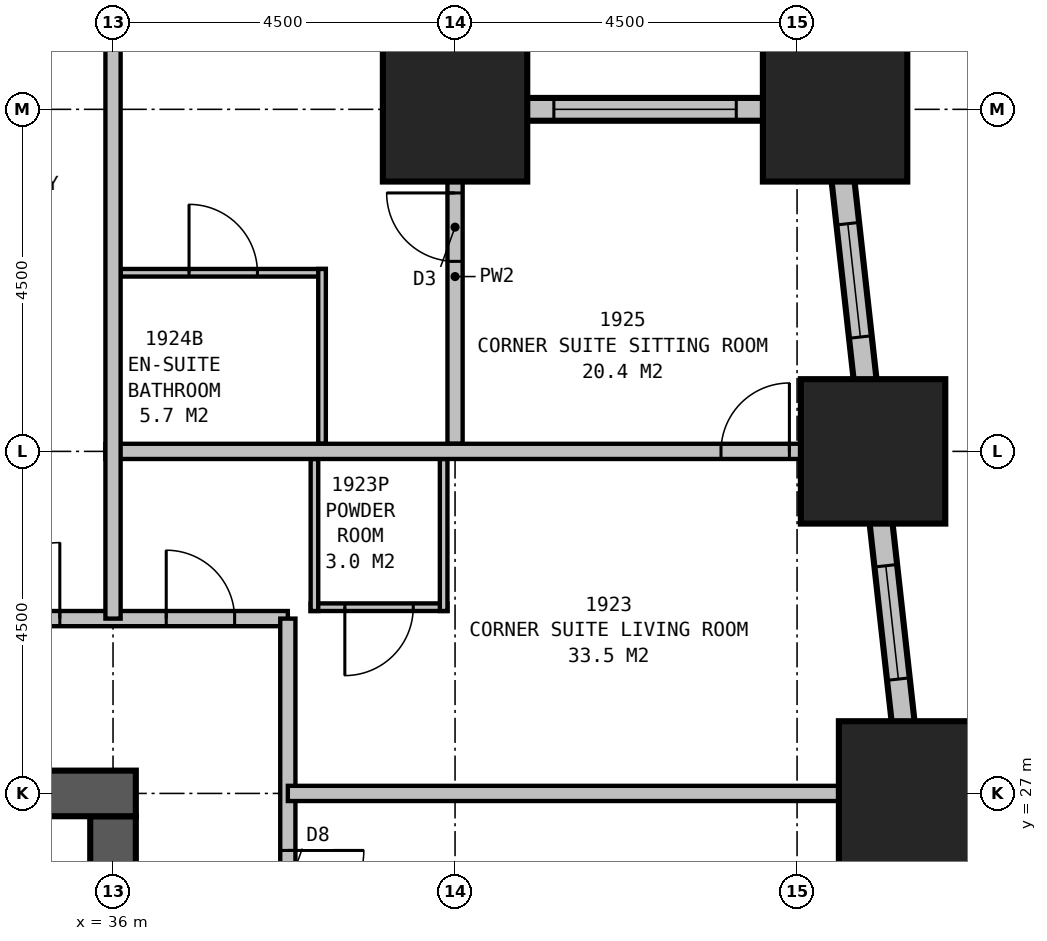
"""IFC4 building model, lengths in metres.
Left out: names, types, materials, properties, quantities, classifications, styles, units other than length and angle.
Written with IfcOpenShell. Run it as: python <this file> out.ifc"""

import sys

from ifc_helpers import new_model, si_unit, direction, frame, frame_2d, origin, origin_2d, place, context, subcontext, project, spatial, rectangle, extrude, element, fill, save


model = new_model("IFC4")
c1 = context("Model", 3, precision=1e-05, world=origin(), true_north=direction((0.0, 1.0)))
c2 = subcontext(c1, "Body", "Model", "MODEL_VIEW")
j1 = project(units=[si_unit("LENGTHUNIT", "METRE"), si_unit("PLANEANGLEUNIT", "RADIAN")], contexts=[c1])
p1 = place(None, origin())
s1 = spatial("IfcSite", under=j1, at=p1, CompositionType="ELEMENT")
p2 = place(p1, origin())
s2 = spatial("IfcBuilding", under=s1, at=p2, CompositionType="ELEMENT")
p3 = place(p2, frame((0.0, 0.0, 78.7)))
s3 = spatial("IfcBuildingStorey", under=s2, at=p3, CompositionType="ELEMENT", Elevation=78.7)
for number, where, z_axis, x_axis in (
    (1, (46.5, 27.0, 0.0), (0.0, 0.0, 1.0), (1.0, 0.0, 0.0)),
    (2, (46.0, 31.5, 0.0), (0.0, 0.0, 1.0), (1.0, 0.0, 0.0)),
    (3, (45.5, 36.0, 0.0), (0.0, 0.0, 1.0), (1.0, 0.0, 0.0)),
    (4, (40.5, 36.0, 0.0), (0.0, 0.0, 1.0), (1.0, 0.0, 0.0)),
):
    element("IfcColumn", number, at=place(p3, frame(where, z_axis=z_axis, x_axis=x_axis)), inside=s3, PredefinedType="COLUMN", context=c2, shape_type="SweptSolid", body=[
        extrude(rectangle(XDim=1.9, YDim=1.9, at=origin_2d()), origin(), (0.0, 0.0, 1.0), 3.5),
    ])
p4 = place(p3, frame((36.3, 27.0, 0.0), z_axis=(0.0, 0.0, 1.0), x_axis=(-1.0, 0.0, 0.0)))
e5 = element("IfcWall", 5, at=p4, inside=s3, PredefinedType="SHEAR", context=c2, shape_type="SweptSolid", body=[
    extrude(rectangle(XDim=23.1, YDim=0.6, at=frame_2d((11.55, 0.0))), origin(), (0.0, 0.0, 1.0), 3.5),
])
p5 = place(p4, frame((17.05, 0.0, 0.0)))
e6 = element("IfcOpeningElement", 6, at=p5, cuts=e5, PredefinedType="OPENING", context=c2, shape_type="SweptSolid", body=[
    extrude(rectangle(XDim=1.0, YDim=2.1, at=frame_2d((0.5, 1.05))), frame((0.0, 0.31, 0.0), z_axis=(0.0, -1.0, 0.0), x_axis=(1.0, 0.0, 0.0)), (0.0, 0.0, 1.0), 0.62),
])
p6 = place(p4, frame((12.05, 0.0, 0.0)))
e7 = element("IfcOpeningElement", 7, at=p6, cuts=e5, PredefinedType="OPENING", context=c2, shape_type="SweptSolid", body=[
    extrude(rectangle(XDim=1.0, YDim=2.1, at=frame_2d((0.5, 1.05))), frame((0.0, 0.31, 0.0), z_axis=(0.0, -1.0, 0.0), x_axis=(1.0, 0.0, 0.0)), (0.0, 0.0, 1.0), 0.62),
])
p7 = place(p4, frame((7.05, 0.0, 0.0)))
e8 = element("IfcOpeningElement", 8, at=p7, cuts=e5, PredefinedType="OPENING", context=c2, shape_type="SweptSolid", body=[
    extrude(rectangle(XDim=1.0, YDim=2.1, at=frame_2d((0.5, 1.05))), frame((0.0, 0.31, 0.0), z_axis=(0.0, -1.0, 0.0), x_axis=(1.0, 0.0, 0.0)), (0.0, 0.0, 1.0), 0.62),
])
p8 = place(p3, frame((36.0, 20.0, 0.0), z_axis=(0.0, 0.0, 1.0), x_axis=(0.0, 1.0, 0.0)))
e9 = element("IfcWall", 9, at=p8, inside=s3, PredefinedType="SHEAR", context=c2, shape_type="SweptSolid", body=[
    extrude(rectangle(XDim=6.7, YDim=0.6, at=frame_2d((3.35, 0.0))), origin(), (0.0, 0.0, 1.0), 3.5),
])
p9 = place(p3, frame((49.017, 4.351, 0.0), z_axis=(0.0, 0.0, 1.0), x_axis=(-0.110433201132, 0.993883548555, 0.0)))
e10 = element("IfcWall", 10, at=p9, inside=s3, PredefinedType="STANDARD", context=c2, shape_type="SweptSolid", body=[
    extrude(rectangle(XDim=31.994, YDim=0.3, at=frame_2d((15.997, 0.0))), origin(), (0.0, 0.0, 1.0), 2.05),
])
p10 = place(p9, frame((1.664, 0.0, 0.5)))
e11 = element("IfcOpeningElement", 11, at=p10, cuts=e10, PredefinedType="OPENING", context=c2, shape_type="SweptSolid", body=[
    extrude(rectangle(XDim=1.5, YDim=1.4, at=frame_2d((0.75, 0.7))), frame((0.0, 0.16, 0.0), z_axis=(0.0, -1.0, 0.0), x_axis=(1.0, 0.0, 0.0)), (0.0, 0.0, 1.0), 0.32),
])
p11 = place(p9, frame((6.192, 0.0, 0.5)))
e12 = element("IfcOpeningElement", 12, at=p11, cuts=e10, PredefinedType="OPENING", context=c2, shape_type="SweptSolid", body=[
    extrude(rectangle(XDim=1.5, YDim=1.4, at=frame_2d((0.75, 0.7))), frame((0.0, 0.16, 0.0), z_axis=(0.0, -1.0, 0.0), x_axis=(1.0, 0.0, 0.0)), (0.0, 0.0, 1.0), 0.32),
])
p12 = place(p9, frame((10.719, 0.0, 0.5)))
e13 = element("IfcOpeningElement", 13, at=p12, cuts=e10, PredefinedType="OPENING", context=c2, shape_type="SweptSolid", body=[
    extrude(rectangle(XDim=1.5, YDim=1.4, at=frame_2d((0.75, 0.7))), frame((0.0, 0.16, 0.0), z_axis=(0.0, -1.0, 0.0), x_axis=(1.0, 0.0, 0.0)), (0.0, 0.0, 1.0), 0.32),
])
p13 = place(p9, frame((15.247, 0.0, 0.5)))
e14 = element("IfcOpeningElement", 14, at=p13, cuts=e10, PredefinedType="OPENING", context=c2, shape_type="SweptSolid", body=[
    extrude(rectangle(XDim=1.5, YDim=1.4, at=frame_2d((0.75, 0.7))), frame((0.0, 0.16, 0.0), z_axis=(0.0, -1.0, 0.0), x_axis=(1.0, 0.0, 0.0)), (0.0, 0.0, 1.0), 0.32),
])
p14 = place(p9, frame((19.775, 0.0, 0.5)))
e15 = element("IfcOpeningElement", 15, at=p14, cuts=e10, PredefinedType="OPENING", context=c2, shape_type="SweptSolid", body=[
    extrude(rectangle(XDim=1.5, YDim=1.4, at=frame_2d((0.75, 0.7))), frame((0.0, 0.16, 0.0), z_axis=(0.0, -1.0, 0.0), x_axis=(1.0, 0.0, 0.0)), (0.0, 0.0, 1.0), 0.32),
])
p15 = place(p9, frame((24.302, 0.0, 0.5)))
e16 = element("IfcOpeningElement", 16, at=p15, cuts=e10, PredefinedType="OPENING", context=c2, shape_type="SweptSolid", body=[
    extrude(rectangle(XDim=1.5, YDim=1.4, at=frame_2d((0.75, 0.7))), frame((0.0, 0.16, 0.0), z_axis=(0.0, -1.0, 0.0), x_axis=(1.0, 0.0, 0.0)), (0.0, 0.0, 1.0), 0.32),
])
p16 = place(p9, frame((28.83, 0.0, 0.5)))
e17 = element("IfcOpeningElement", 17, at=p16, cuts=e10, PredefinedType="OPENING", context=c2, shape_type="SweptSolid", body=[
    extrude(rectangle(XDim=1.5, YDim=1.4, at=frame_2d((0.75, 0.7))), frame((0.0, 0.16, 0.0), z_axis=(0.0, -1.0, 0.0), x_axis=(1.0, 0.0, 0.0)), (0.0, 0.0, 1.0), 0.32),
])
p17 = place(p3, frame((45.65, 36.0, 0.0), z_axis=(0.0, 0.0, 1.0), x_axis=(-1.0, 0.0, 0.0)))
e18 = element("IfcWall", 18, at=p17, inside=s3, PredefinedType="STANDARD", context=c2, shape_type="SweptSolid", body=[
    extrude(rectangle(XDim=5.3, YDim=0.3, at=frame_2d((2.65, 0.0))), origin(), (0.0, 0.0, 1.0), 2.05),
])
p18 = place(p17, frame((1.45, 0.0, 0.5)))
e19 = element("IfcOpeningElement", 19, at=p18, cuts=e18, PredefinedType="OPENING", context=c2, shape_type="SweptSolid", body=[
    extrude(rectangle(XDim=2.4, YDim=1.4, at=frame_2d((1.2, 0.7))), frame((0.0, 0.16, 0.0), z_axis=(0.0, -1.0, 0.0), x_axis=(1.0, 0.0, 0.0)), (0.0, 0.0, 1.0), 0.32),
])
p19 = place(p3, frame((40.5, 35.85, 0.0), z_axis=(0.0, 0.0, 1.0), x_axis=(0.0, 1.0, 0.0)))
e20 = element("IfcWall", 20, at=p19, inside=s3, PredefinedType="STANDARD", context=c2, shape_type="SweptSolid", body=[
    extrude(rectangle(XDim=4.8, YDim=0.3, at=frame_2d((2.4, 0.0))), origin(), (0.0, 0.0, 1.0), 2.05),
])
p20 = place(p19, frame((1.65, 0.0, 0.5)))
e21 = element("IfcOpeningElement", 21, at=p20, cuts=e20, PredefinedType="OPENING", context=c2, shape_type="SweptSolid", body=[
    extrude(rectangle(XDim=1.5, YDim=1.4, at=frame_2d((0.75, 0.7))), frame((0.0, 0.16, 0.0), z_axis=(0.0, -1.0, 0.0), x_axis=(1.0, 0.0, 0.0)), (0.0, 0.0, 1.0), 0.32),
])
p21 = place(p3, frame((11.2, 29.3, 0.0), z_axis=(0.0, 0.0, 1.0), x_axis=(1.0, 0.0, 0.0)))
e22 = element("IfcWall", 22, at=p21, inside=s3, PredefinedType="PARTITIONING", context=c2, shape_type="SweptSolid", body=[
    extrude(rectangle(XDim=27.1, YDim=0.2, at=frame_2d((13.55, 0.0))), origin(), (0.0, 0.0, 1.0), 3.25),
])
p22 = place(p21, frame((4.2, 0.0, 0.0)))
e23 = element("IfcOpeningElement", 23, at=p22, cuts=e22, PredefinedType="OPENING", context=c2, shape_type="SweptSolid", body=[
    extrude(rectangle(XDim=0.9, YDim=2.1, at=frame_2d((0.45, 1.05))), frame((0.0, 0.11, 0.0), z_axis=(0.0, -1.0, 0.0), x_axis=(1.0, 0.0, 0.0)), (0.0, 0.0, 1.0), 0.22),
])
p23 = place(p21, frame((8.7, 0.0, 0.0)))
e24 = element("IfcOpeningElement", 24, at=p23, cuts=e22, PredefinedType="OPENING", context=c2, shape_type="SweptSolid", body=[
    extrude(rectangle(XDim=0.9, YDim=2.1, at=frame_2d((0.45, 1.05))), frame((0.0, 0.11, 0.0), z_axis=(0.0, -1.0, 0.0), x_axis=(1.0, 0.0, 0.0)), (0.0, 0.0, 1.0), 0.22),
])
p24 = place(p21, frame((13.2, 0.0, 0.0)))
e25 = element("IfcOpeningElement", 25, at=p24, cuts=e22, PredefinedType="OPENING", context=c2, shape_type="SweptSolid", body=[
    extrude(rectangle(XDim=0.9, YDim=2.1, at=frame_2d((0.45, 1.05))), frame((0.0, 0.11, 0.0), z_axis=(0.0, -1.0, 0.0), x_axis=(1.0, 0.0, 0.0)), (0.0, 0.0, 1.0), 0.22),
])
p25 = place(p21, frame((17.55, 0.0, 0.0)))
e26 = element("IfcOpeningElement", 26, at=p25, cuts=e22, PredefinedType="OPENING", context=c2, shape_type="SweptSolid", body=[
    extrude(rectangle(XDim=0.9, YDim=2.1, at=frame_2d((0.45, 1.05))), frame((0.0, 0.11, 0.0), z_axis=(0.0, -1.0, 0.0), x_axis=(1.0, 0.0, 0.0)), (0.0, 0.0, 1.0), 0.22),
])
p26 = place(p21, frame((23.1, 0.0, 0.0)))
e27 = element("IfcOpeningElement", 27, at=p26, cuts=e22, PredefinedType="OPENING", context=c2, shape_type="SweptSolid", body=[
    extrude(rectangle(XDim=1.0, YDim=2.1, at=frame_2d((0.5, 1.05))), frame((0.0, 0.11, 0.0), z_axis=(0.0, -1.0, 0.0), x_axis=(1.0, 0.0, 0.0)), (0.0, 0.0, 1.0), 0.22),
])
p27 = place(p21, frame((25.5, 0.0, 0.0)))
e28 = element("IfcOpeningElement", 28, at=p27, cuts=e22, PredefinedType="OPENING", context=c2, shape_type="SweptSolid", body=[
    extrude(rectangle(XDim=0.9, YDim=2.1, at=frame_2d((0.45, 1.05))), frame((0.0, 0.11, 0.0), z_axis=(0.0, -1.0, 0.0), x_axis=(1.0, 0.0, 0.0)), (0.0, 0.0, 1.0), 0.22),
])
p28 = place(p21, frame((0.7, 0.0, 0.0)))
e29 = element("IfcOpeningElement", 29, at=p28, cuts=e22, PredefinedType="OPENING", context=c2, shape_type="SweptSolid", body=[
    extrude(rectangle(XDim=0.9, YDim=2.1, at=frame_2d((0.45, 1.05))), frame((0.0, 0.11, 0.0), z_axis=(0.0, -1.0, 0.0), x_axis=(1.0, 0.0, 0.0)), (0.0, 0.0, 1.0), 0.22),
])
p29 = place(p3, frame((38.3, 10.6, 0.0), z_axis=(0.0, 0.0, 1.0), x_axis=(0.0, 1.0, 0.0)))
e30 = element("IfcWall", 30, at=p29, inside=s3, PredefinedType="PARTITIONING", context=c2, shape_type="SweptSolid", body=[
    extrude(rectangle(XDim=18.7, YDim=0.2, at=frame_2d((9.35, 0.0))), origin(), (0.0, 0.0, 1.0), 3.25),
])
p30 = place(p29, frame((6.75, 0.0, 0.0), z_axis=(0.0, 0.0, 1.0), x_axis=(-1.0, 0.0, 0.0)))
e31 = element("IfcOpeningElement", 31, at=p30, cuts=e30, PredefinedType="OPENING", context=c2, shape_type="SweptSolid", body=[
    extrude(rectangle(XDim=0.9, YDim=2.1, at=frame_2d((0.45, 1.05))), frame((0.0, 0.11, 0.0), z_axis=(0.0, -1.0, 0.0), x_axis=(1.0, 0.0, 0.0)), (0.0, 0.0, 1.0), 0.22),
])
p31 = place(p29, frame((9.85, 0.0, 0.0), z_axis=(0.0, 0.0, 1.0), x_axis=(-1.0, 0.0, 0.0)))
e32 = element("IfcOpeningElement", 32, at=p31, cuts=e30, PredefinedType="OPENING", context=c2, shape_type="SweptSolid", body=[
    extrude(rectangle(XDim=1.0, YDim=2.1, at=frame_2d((0.5, 1.05))), frame((0.0, 0.11, 0.0), z_axis=(0.0, -1.0, 0.0), x_axis=(1.0, 0.0, 0.0)), (0.0, 0.0, 1.0), 0.22),
])
p32 = place(p29, frame((15.65, 0.0, 0.0), z_axis=(0.0, 0.0, 1.0), x_axis=(-1.0, 0.0, 0.0)))
e33 = element("IfcOpeningElement", 33, at=p32, cuts=e30, PredefinedType="OPENING", context=c2, shape_type="SweptSolid", body=[
    extrude(rectangle(XDim=1.0, YDim=2.1, at=frame_2d((0.5, 1.05))), frame((0.0, 0.11, 0.0), z_axis=(0.0, -1.0, 0.0), x_axis=(1.0, 0.0, 0.0)), (0.0, 0.0, 1.0), 0.22),
])
p33 = place(p3, frame((38.3, 27.0, 0.0), z_axis=(0.0, 0.0, 1.0), x_axis=(1.0, 0.0, 0.0)))
e34 = element("IfcWall", 34, at=p33, inside=s3, PredefinedType="PARTITIONING", context=c2, shape_type="SweptSolid", body=[
    extrude(rectangle(XDim=7.977, YDim=0.2, at=frame_2d((3.988, 0.0))), origin(), (0.0, 0.0, 1.0), 1.95),
])
p34 = place(p3, frame((36.0, 29.3, 0.0), z_axis=(0.0, 0.0, 1.0), x_axis=(0.0, 1.0, 0.0)))
e35 = element("IfcWall", 35, at=p34, inside=s3, PredefinedType="PARTITIONING", context=c2, shape_type="SweptSolid", body=[
    extrude(rectangle(XDim=11.2, YDim=0.2, at=frame_2d((5.6, 0.0))), origin(), (0.0, 0.0, 1.0), 2.25),
])
p35 = place(p3, frame((35.9, 31.5, 0.0), z_axis=(0.0, 0.0, 1.0), x_axis=(1.0, 0.0, 0.0)))
e36 = element("IfcWall", 36, at=p35, inside=s3, PredefinedType="PARTITIONING", context=c2, shape_type="SweptSolid", body=[
    extrude(rectangle(XDim=10.099, YDim=0.2, at=frame_2d((5.05, 0.0))), origin(), (0.0, 0.0, 1.0), 3.25),
])
p36 = place(p35, frame((8.099, 0.0, 0.0)))
e37 = element("IfcOpeningElement", 37, at=p36, cuts=e36, PredefinedType="OPENING", context=c2, shape_type="SweptSolid", body=[
    extrude(rectangle(XDim=0.9, YDim=2.1, at=frame_2d((0.45, 1.05))), frame((0.0, 0.11, 0.0), z_axis=(0.0, -1.0, 0.0), x_axis=(1.0, 0.0, 0.0)), (0.0, 0.0, 1.0), 0.22),
])
p37 = place(p3, frame((40.35, 31.4, 0.0), z_axis=(0.0, 0.0, 1.0), x_axis=(0.0, -1.0, 0.0)))
e38 = element("IfcWall", 38, at=p37, inside=s3, PredefinedType="PLUMBINGWALL", context=c2, shape_type="SweptSolid", body=[
    extrude(rectangle(XDim=2.0, YDim=0.1, at=frame_2d((1.0, 0.0))), origin(), (0.0, 0.0, 1.0), 2.25),
])
p38 = place(p3, frame((38.65, 31.4, 0.0), z_axis=(0.0, 0.0, 1.0), x_axis=(0.0, -1.0, 0.0)))
e39 = element("IfcWall", 39, at=p38, inside=s3, PredefinedType="PLUMBINGWALL", context=c2, shape_type="SweptSolid", body=[
    extrude(rectangle(XDim=2.0, YDim=0.1, at=frame_2d((1.0, 0.0))), origin(), (0.0, 0.0, 1.0), 3.25),
])
p39 = place(p3, frame((38.6, 29.45, 0.0), z_axis=(0.0, 0.0, 1.0), x_axis=(1.0, 0.0, 0.0)))
e40 = element("IfcWall", 40, at=p39, inside=s3, PredefinedType="PLUMBINGWALL", context=c2, shape_type="SweptSolid", body=[
    extrude(rectangle(XDim=1.8, YDim=0.1, at=frame_2d((0.9, 0.0))), origin(), (0.0, 0.0, 1.0), 3.25),
])
p40 = place(p39, frame((1.35, 0.0, 0.0), z_axis=(0.0, 0.0, 1.0), x_axis=(-1.0, 0.0, 0.0)))
e41 = element("IfcOpeningElement", 41, at=p40, cuts=e40, PredefinedType="OPENING", context=c2, shape_type="SweptSolid", body=[
    extrude(rectangle(XDim=0.9, YDim=2.1, at=frame_2d((0.45, 1.05))), frame((0.0, 0.06, 0.0), z_axis=(0.0, -1.0, 0.0), x_axis=(1.0, 0.0, 0.0)), (0.0, 0.0, 1.0), 0.12),
])
p41 = place(p3, frame((40.5, 31.6, 0.0), z_axis=(0.0, 0.0, 1.0), x_axis=(0.0, 1.0, 0.0)))
e42 = element("IfcWall", 42, at=p41, inside=s3, PredefinedType="PARTITIONING", context=c2, shape_type="SweptSolid", body=[
    extrude(rectangle(XDim=4.4, YDim=0.2, at=frame_2d((2.2, 0.0))), origin(), (0.0, 0.0, 1.0), 2.25),
])
p42 = place(p41, frame((2.4, 0.0, 0.0)))
e43 = element("IfcOpeningElement", 43, at=p42, cuts=e42, PredefinedType="OPENING", context=c2, shape_type="SweptSolid", body=[
    extrude(rectangle(XDim=0.9, YDim=2.1, at=frame_2d((0.45, 1.05))), frame((0.0, 0.11, 0.0), z_axis=(0.0, -1.0, 0.0), x_axis=(1.0, 0.0, 0.0)), (0.0, 0.0, 1.0), 0.22),
])
p43 = place(p3, frame((38.75, 31.6, 0.0), z_axis=(0.0, 0.0, 1.0), x_axis=(0.0, 1.0, 0.0)))
e44 = element("IfcWall", 44, at=p43, inside=s3, PredefinedType="PLUMBINGWALL", context=c2, shape_type="SweptSolid", body=[
    extrude(rectangle(XDim=2.3, YDim=0.1, at=frame_2d((1.15, 0.0))), origin(), (0.0, 0.0, 1.0), 3.25),
])
p44 = place(p3, frame((36.1, 33.85, 0.0), z_axis=(0.0, 0.0, 1.0), x_axis=(1.0, 0.0, 0.0)))
e45 = element("IfcWall", 45, at=p44, inside=s3, PredefinedType="PLUMBINGWALL", context=c2, shape_type="SweptSolid", body=[
    extrude(rectangle(XDim=2.7, YDim=0.1, at=frame_2d((1.35, 0.0))), origin(), (0.0, 0.0, 1.0), 3.25),
])
p45 = place(p44, frame((0.9, 0.0, 0.0)))
e46 = element("IfcOpeningElement", 46, at=p45, cuts=e45, PredefinedType="OPENING", context=c2, shape_type="SweptSolid", body=[
    extrude(rectangle(XDim=0.9, YDim=2.1, at=frame_2d((0.45, 1.05))), frame((0.0, 0.06, 0.0), z_axis=(0.0, -1.0, 0.0), x_axis=(1.0, 0.0, 0.0)), (0.0, 0.0, 1.0), 0.12),
])
p46 = place(p15, origin())
e47 = element("IfcWindow", 47, at=p46, inside=s3, PartitioningType="SINGLE_PANEL", PredefinedType="WINDOW", context=c2, shape_type="SweptSolid", body=[
    extrude(rectangle(XDim=1.5, YDim=1.4, at=frame_2d((0.75, 0.7))), frame((0.0, 0.03, 0.0), z_axis=(0.0, -1.0, 0.0), x_axis=(1.0, 0.0, 0.0)), (0.0, 0.0, 1.0), 0.06),
])
fill(e16, e47)
p47 = place(p16, origin())
e48 = element("IfcWindow", 48, at=p47, inside=s3, PartitioningType="SINGLE_PANEL", PredefinedType="WINDOW", context=c2, shape_type="SweptSolid", body=[
    extrude(rectangle(XDim=1.5, YDim=1.4, at=frame_2d((0.75, 0.7))), frame((0.0, 0.03, 0.0), z_axis=(0.0, -1.0, 0.0), x_axis=(1.0, 0.0, 0.0)), (0.0, 0.0, 1.0), 0.06),
])
fill(e17, e48)
p48 = place(p18, origin())
e49 = element("IfcWindow", 49, at=p48, inside=s3, PartitioningType="SINGLE_PANEL", PredefinedType="WINDOW", context=c2, shape_type="SweptSolid", body=[
    extrude(rectangle(XDim=2.4, YDim=1.4, at=frame_2d((1.2, 0.7))), frame((0.0, 0.03, 0.0), z_axis=(0.0, -1.0, 0.0), x_axis=(1.0, 0.0, 0.0)), (0.0, 0.0, 1.0), 0.06),
])
fill(e19, e49)
p49 = place(p26, origin())
e50 = element("IfcDoor", 50, at=p49, inside=s3, OperationType="SINGLE_SWING_RIGHT", PredefinedType="DOOR", context=c2, shape_type="SweptSolid", body=[
    extrude(rectangle(XDim=1.0, YDim=2.1, at=frame_2d((0.5, 1.05))), frame((0.0, 0.025, 0.0), z_axis=(0.0, -1.0, 0.0), x_axis=(1.0, 0.0, 0.0)), (0.0, 0.0, 1.0), 0.05),
])
fill(e27, e50)
p50 = place(p27, origin())
e51 = element("IfcDoor", 51, at=p50, inside=s3, OperationType="SINGLE_SWING_LEFT", PredefinedType="DOOR", context=c2, shape_type="SweptSolid", body=[
    extrude(rectangle(XDim=0.9, YDim=2.1, at=frame_2d((0.45, 1.05))), frame((0.0, 0.025, 0.0), z_axis=(0.0, -1.0, 0.0), x_axis=(1.0, 0.0, 0.0)), (0.0, 0.0, 1.0), 0.05),
])
fill(e28, e51)
p51 = place(p32, origin())
e52 = element("IfcDoor", 52, at=p51, inside=s3, OperationType="SINGLE_SWING_LEFT", PredefinedType="DOOR", context=c2, shape_type="SweptSolid", body=[
    extrude(rectangle(XDim=1.0, YDim=2.1, at=frame_2d((0.5, 1.05))), frame((0.0, 0.025, 0.0), z_axis=(0.0, -1.0, 0.0), x_axis=(1.0, 0.0, 0.0)), (0.0, 0.0, 1.0), 0.05),
])
fill(e33, e52)
p52 = place(p36, origin())
e53 = element("IfcDoor", 53, at=p52, inside=s3, OperationType="SINGLE_SWING_RIGHT", PredefinedType="DOOR", context=c2, shape_type="SweptSolid", body=[
    extrude(rectangle(XDim=0.9, YDim=2.1, at=frame_2d((0.45, 1.05))), frame((0.0, 0.025, 0.0), z_axis=(0.0, -1.0, 0.0), x_axis=(1.0, 0.0, 0.0)), (0.0, 0.0, 1.0), 0.05),
])
fill(e37, e53)
p53 = place(p40, origin())
e54 = element("IfcDoor", 54, at=p53, inside=s3, OperationType="SINGLE_SWING_RIGHT", PredefinedType="DOOR", context=c2, shape_type="SweptSolid", body=[
    extrude(rectangle(XDim=0.9, YDim=2.1, at=frame_2d((0.45, 1.05))), frame((0.0, 0.025, 0.0), z_axis=(0.0, -1.0, 0.0), x_axis=(1.0, 0.0, 0.0)), (0.0, 0.0, 1.0), 0.05),
])
fill(e41, e54)
p54 = place(p42, origin())
e55 = element("IfcDoor", 55, at=p54, inside=s3, OperationType="SINGLE_SWING_RIGHT", PredefinedType="DOOR", context=c2, shape_type="SweptSolid", body=[
    extrude(rectangle(XDim=0.9, YDim=2.1, at=frame_2d((0.45, 1.05))), frame((0.0, 0.025, 0.0), z_axis=(0.0, -1.0, 0.0), x_axis=(1.0, 0.0, 0.0)), (0.0, 0.0, 1.0), 0.05),
])
fill(e43, e55)
p55 = place(p45, origin())
e56 = element("IfcDoor", 56, at=p55, inside=s3, OperationType="SINGLE_SWING_LEFT", PredefinedType="DOOR", context=c2, shape_type="SweptSolid", body=[
    extrude(rectangle(XDim=0.9, YDim=2.1, at=frame_2d((0.45, 1.05))), frame((0.0, 0.025, 0.0), z_axis=(0.0, -1.0, 0.0), x_axis=(1.0, 0.0, 0.0)), (0.0, 0.0, 1.0), 0.05),
])
fill(e46, e56)
save(model, sys.argv[1])
